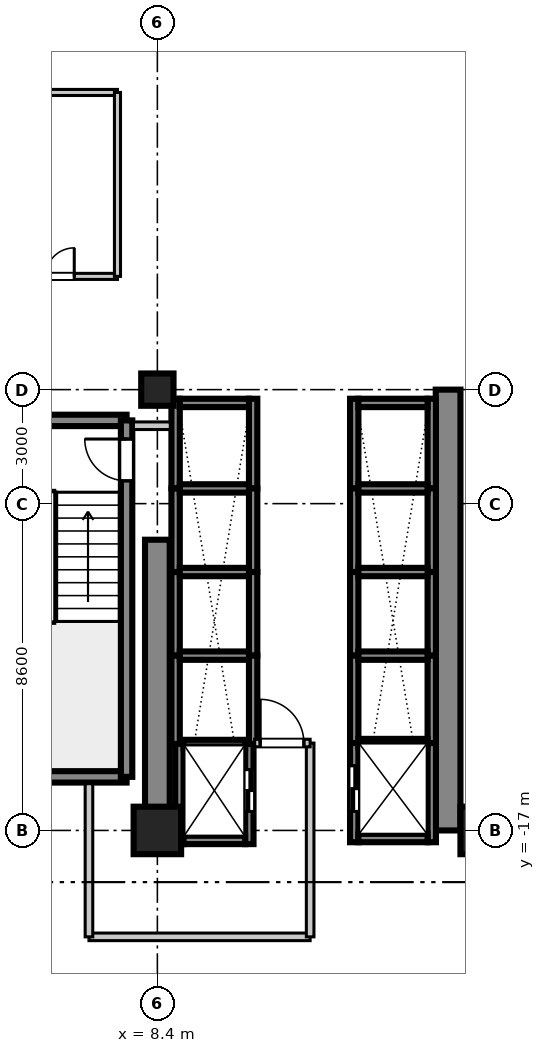
"""IFC4 building model, lengths in metres.
Left out: names, types, materials, properties, quantities, classifications, styles, units other than length and angle.
Written with IfcOpenShell. Run it as: python <this file> out.ifc"""

import sys

from ifc_helpers import new_model, si_unit, direction, frame, frame_2d, origin, origin_2d, place, context, subcontext, project, spatial, rectangle, extrude, source, transform, mapped, element, fill, save


model = new_model("IFC4")
c1 = context("Model", 3, precision=1e-05, world=origin(), true_north=direction((0.0, 1.0)))
c2 = subcontext(c1, "Body", "Model", "MODEL_VIEW")
j1 = project(units=[si_unit("LENGTHUNIT", "METRE"), si_unit("PLANEANGLEUNIT", "RADIAN")], contexts=[c1])
p1 = place(None, origin())
s1 = spatial("IfcSite", under=j1, at=p1, CompositionType="ELEMENT")
p2 = place(p1, origin())
s2 = spatial("IfcBuilding", under=s1, at=p2, CompositionType="ELEMENT")
p3 = place(p2, frame((0.0, 0.0, 117.5)))
s3 = spatial("IfcBuildingStorey", under=s2, at=p3, CompositionType="ELEMENT", Elevation=117.5)
m1 = source(origin(), c2, "Body", "SweptSolid", [
    extrude(rectangle(XDim=1.25, YDim=1.25, at=origin_2d()), origin(), (0.0, 0.0, 1.0), 3.605),
])
p4 = place(p3, frame((8.4, -17.0, 0.0), z_axis=(0.0, 0.0, 1.0), x_axis=(1.0, 0.0, 0.0)))
e1 = element("IfcColumn", 1, at=p4, inside=s3, PredefinedType="COLUMN", context=c2, shape_type="MappedRepresentation", body=[
    mapped(m1, transform((0.0, 0.0, 0.0), scale=1.0)),
])
m2 = source(origin(), c2, "Body", "SweptSolid", [
    extrude(rectangle(XDim=0.85, YDim=0.85, at=origin_2d()), origin(), (0.0, 0.0, 1.0), 3.605),
])
p5 = place(p3, frame((8.4, -5.4, 0.0), z_axis=(0.0, 0.0, 1.0), x_axis=(1.0, 0.0, 0.0)))
e2 = element("IfcColumn", 2, at=p5, inside=s3, PredefinedType="PILASTER", context=c2, shape_type="MappedRepresentation", body=[
    mapped(m2, transform((0.0, 0.0, 0.0), scale=1.0)),
])
p6 = place(p3, frame((17.0, -17.0, 0.0), z_axis=(0.0, 0.0, 1.0), x_axis=(1.0, 0.0, 0.0)))
e3 = element("IfcColumn", 3, at=p6, inside=s3, PredefinedType="COLUMN", context=c2, shape_type="MappedRepresentation", body=[
    mapped(m1, transform((0.0, 0.0, 0.0), scale=1.0)),
])
m3 = source(origin(), c2, "Body", "SweptSolid", [
    extrude(rectangle(XDim=7.65, YDim=0.65, at=frame_2d((3.825, 0.0))), origin(), (0.0, 0.0, 1.0), 3.38),
])
p7 = place(p3, frame((8.4, -17.0, 0.0), z_axis=(0.0, 0.0, 1.0), x_axis=(0.0, 1.0, 0.0)))
e4 = element("IfcWall", 4, at=p7, inside=s3, PredefinedType="SHEAR", context=c2, shape_type="MappedRepresentation", body=[
    mapped(m3, transform((0.0, 0.0, 0.0), scale=1.0)),
])
m4 = source(origin(), c2, "Body", "SweptSolid", [
    extrude(rectangle(XDim=11.6, YDim=0.65, at=frame_2d((5.8, 0.0))), origin(), (0.0, 0.0, 1.0), 3.38),
])
p8 = place(p3, frame((16.05, -17.0, 0.0), z_axis=(0.0, 0.0, 1.0), x_axis=(0.0, 1.0, 0.0)))
e5 = element("IfcWall", 5, at=p8, inside=s3, PredefinedType="SHEAR", context=c2, shape_type="MappedRepresentation", body=[
    mapped(m4, transform((0.0, 0.0, 0.0), scale=1.0)),
])
m5 = source(origin(), c2, "Body", "SweptSolid", [
    extrude(rectangle(XDim=3.98, YDim=0.3, at=frame_2d((1.99, 0.0))), origin(), (0.0, 0.0, 1.0), 3.38),
])
for number, where, z_axis, x_axis in (
    (6, (3.61, -15.59, 0.0), (0.0, 0.0, 1.0), (1.0, 0.0, 0.0)),
    (7, (3.61, -6.21, 0.0), (0.0, 0.0, 1.0), (1.0, 0.0, 0.0)),
):
    element("IfcWall", number, at=place(p3, frame(where, z_axis=z_axis, x_axis=x_axis)), inside=s3, PredefinedType="SHEAR", context=c2, shape_type="MappedRepresentation", body=[
        mapped(m5, transform((0.0, 0.0, 0.0), scale=1.0)),
    ])
m6 = source(origin(), c2, "Body", "SweptSolid", [
    extrude(rectangle(XDim=9.38, YDim=0.3, at=frame_2d((4.69, 0.0))), origin(), (0.0, 0.0, 1.0), 3.38),
])
p9 = place(p3, frame((7.59, -15.59, 0.0), z_axis=(0.0, 0.0, 1.0), x_axis=(0.0, 1.0, 0.0)))
e8 = element("IfcWall", 8, at=p9, inside=s3, PredefinedType="SHEAR", context=c2, shape_type="MappedRepresentation", body=[
    mapped(m6, transform((0.0, 0.0, 0.0), scale=1.0)),
])
p10 = place(p9, frame((7.79, 0.0, 0.0)))
e9 = element("IfcOpeningElement", 9, at=p10, cuts=e8, PredefinedType="OPENING", context=c2, shape_type="SweptSolid", body=[
    extrude(rectangle(XDim=1.1, YDim=2.15, at=frame_2d((0.55, 1.075))), frame((0.0, 0.16, 0.0), z_axis=(0.0, -1.0, 0.0), x_axis=(1.0, 0.0, 0.0)), (0.0, 0.0, 1.0), 0.32),
])
m7 = source(origin(), c2, "Body", "SweptSolid", [
    extrude(rectangle(XDim=2.36, YDim=0.22, at=frame_2d((1.18, 0.0))), origin(), (0.0, 0.0, 1.0), 3.38),
])
for number, where, z_axis, x_axis in (
    (10, (13.58, -8.0, 0.0), (0.0, 0.0, 1.0), (0.0, 1.0, 0.0)),
    (11, (15.62, -8.0, 0.0), (0.0, 0.0, 1.0), (0.0, 1.0, 0.0)),
):
    element("IfcWall", number, at=place(p3, frame(where, z_axis=z_axis, x_axis=x_axis)), inside=s3, PredefinedType="SHEAR", context=c2, shape_type="MappedRepresentation", body=[
        mapped(m7, transform((0.0, 0.0, 0.0), scale=1.0)),
    ])
m8 = source(origin(), c2, "Body", "SweptSolid", [
    extrude(rectangle(XDim=1.82, YDim=0.22, at=frame_2d((0.91, 0.0))), origin(), (0.0, 0.0, 1.0), 3.38),
])
p11 = place(p3, frame((13.69, -5.75, 0.0), z_axis=(0.0, 0.0, 1.0), x_axis=(1.0, 0.0, 0.0)))
e12 = element("IfcWall", 12, at=p11, inside=s3, PredefinedType="SHEAR", context=c2, shape_type="MappedRepresentation", body=[
    mapped(m8, transform((0.0, 0.0, 0.0), scale=1.0)),
])
m9 = source(origin(), c2, "Body", "SweptSolid", [
    extrude(rectangle(XDim=2.2, YDim=0.22, at=frame_2d((1.1, 0.0))), origin(), (0.0, 0.0, 1.0), 3.38),
])
for number, where, z_axis, x_axis in (
    (13, (13.58, -10.2, 0.0), (0.0, 0.0, 1.0), (0.0, 1.0, 0.0)),
    (14, (15.62, -10.2, 0.0), (0.0, 0.0, 1.0), (0.0, 1.0, 0.0)),
):
    element("IfcWall", number, at=place(p3, frame(where, z_axis=z_axis, x_axis=x_axis)), inside=s3, PredefinedType="SHEAR", context=c2, shape_type="MappedRepresentation", body=[
        mapped(m9, transform((0.0, 0.0, 0.0), scale=1.0)),
    ])
m10 = source(origin(), c2, "Body", "SweptSolid", [
    extrude(rectangle(XDim=1.82, YDim=0.22, at=frame_2d((0.91, 0.0))), origin(), (0.0, 0.0, 1.0), 3.65),
])
p12 = place(p3, frame((13.69, -8.0, 0.0), z_axis=(0.0, 0.0, 1.0), x_axis=(1.0, 0.0, 0.0)))
e15 = element("IfcWall", 15, at=p12, inside=s3, PredefinedType="SHEAR", context=c2, shape_type="MappedRepresentation", body=[
    mapped(m10, transform((0.0, 0.0, 0.0), scale=1.0)),
])
for number, where, z_axis, x_axis in (
    (16, (13.58, -12.4, 0.0), (0.0, 0.0, 1.0), (0.0, 1.0, 0.0)),
    (17, (15.62, -12.4, 0.0), (0.0, 0.0, 1.0), (0.0, 1.0, 0.0)),
):
    element("IfcWall", number, at=place(p3, frame(where, z_axis=z_axis, x_axis=x_axis)), inside=s3, PredefinedType="SHEAR", context=c2, shape_type="MappedRepresentation", body=[
        mapped(m9, transform((0.0, 0.0, 0.0), scale=1.0)),
    ])
p13 = place(p3, frame((13.69, -10.2, 0.0), z_axis=(0.0, 0.0, 1.0), x_axis=(1.0, 0.0, 0.0)))
e18 = element("IfcWall", 18, at=p13, inside=s3, PredefinedType="SHEAR", context=c2, shape_type="MappedRepresentation", body=[
    mapped(m10, transform((0.0, 0.0, 0.0), scale=1.0)),
])
m11 = source(origin(), c2, "Body", "SweptSolid", [
    extrude(rectangle(XDim=2.3, YDim=0.22, at=frame_2d((1.15, 0.0))), origin(), (0.0, 0.0, 1.0), 3.38),
])
for number, where, z_axis, x_axis in (
    (19, (13.58, -14.7, 0.0), (0.0, 0.0, 1.0), (0.0, 1.0, 0.0)),
    (20, (15.62, -14.7, 0.0), (0.0, 0.0, 1.0), (0.0, 1.0, 0.0)),
):
    element("IfcWall", number, at=place(p3, frame(where, z_axis=z_axis, x_axis=x_axis)), inside=s3, PredefinedType="SHEAR", context=c2, shape_type="MappedRepresentation", body=[
        mapped(m11, transform((0.0, 0.0, 0.0), scale=1.0)),
    ])
p14 = place(p3, frame((13.69, -12.4, 0.0), z_axis=(0.0, 0.0, 1.0), x_axis=(1.0, 0.0, 0.0)))
e21 = element("IfcWall", 21, at=p14, inside=s3, PredefinedType="SHEAR", context=c2, shape_type="MappedRepresentation", body=[
    mapped(m10, transform((0.0, 0.0, 0.0), scale=1.0)),
])
for number, where, z_axis, x_axis in (
    (22, (8.88, -8.0, 0.0), (0.0, 0.0, 1.0), (0.0, 1.0, 0.0)),
    (23, (10.92, -8.0, 0.0), (0.0, 0.0, 1.0), (0.0, 1.0, 0.0)),
):
    element("IfcWall", number, at=place(p3, frame(where, z_axis=z_axis, x_axis=x_axis)), inside=s3, PredefinedType="SHEAR", context=c2, shape_type="MappedRepresentation", body=[
        mapped(m7, transform((0.0, 0.0, 0.0), scale=1.0)),
    ])
p15 = place(p3, frame((8.99, -5.75, 0.0), z_axis=(0.0, 0.0, 1.0), x_axis=(1.0, 0.0, 0.0)))
e24 = element("IfcWall", 24, at=p15, inside=s3, PredefinedType="SHEAR", context=c2, shape_type="MappedRepresentation", body=[
    mapped(m8, transform((0.0, 0.0, 0.0), scale=1.0)),
])
for number, where, z_axis, x_axis in (
    (25, (8.88, -10.2, 0.0), (0.0, 0.0, 1.0), (0.0, 1.0, 0.0)),
    (26, (10.92, -10.2, 0.0), (0.0, 0.0, 1.0), (0.0, 1.0, 0.0)),
):
    element("IfcWall", number, at=place(p3, frame(where, z_axis=z_axis, x_axis=x_axis)), inside=s3, PredefinedType="SHEAR", context=c2, shape_type="MappedRepresentation", body=[
        mapped(m9, transform((0.0, 0.0, 0.0), scale=1.0)),
    ])
p16 = place(p3, frame((8.99, -8.0, 0.0), z_axis=(0.0, 0.0, 1.0), x_axis=(1.0, 0.0, 0.0)))
e27 = element("IfcWall", 27, at=p16, inside=s3, PredefinedType="SHEAR", context=c2, shape_type="MappedRepresentation", body=[
    mapped(m10, transform((0.0, 0.0, 0.0), scale=1.0)),
])
for number, where, z_axis, x_axis in (
    (28, (8.88, -12.4, 0.0), (0.0, 0.0, 1.0), (0.0, 1.0, 0.0)),
    (29, (10.92, -12.4, 0.0), (0.0, 0.0, 1.0), (0.0, 1.0, 0.0)),
):
    element("IfcWall", number, at=place(p3, frame(where, z_axis=z_axis, x_axis=x_axis)), inside=s3, PredefinedType="SHEAR", context=c2, shape_type="MappedRepresentation", body=[
        mapped(m9, transform((0.0, 0.0, 0.0), scale=1.0)),
    ])
p17 = place(p3, frame((8.99, -10.2, 0.0), z_axis=(0.0, 0.0, 1.0), x_axis=(1.0, 0.0, 0.0)))
e30 = element("IfcWall", 30, at=p17, inside=s3, PredefinedType="SHEAR", context=c2, shape_type="MappedRepresentation", body=[
    mapped(m10, transform((0.0, 0.0, 0.0), scale=1.0)),
])
m12 = source(origin(), c2, "Body", "SweptSolid", [
    extrude(rectangle(XDim=2.325, YDim=0.22, at=frame_2d((1.163, 0.0))), origin(), (0.0, 0.0, 1.0), 3.38),
])
for number, where, z_axis, x_axis in (
    (31, (8.88, -14.725, 0.0), (0.0, 0.0, 1.0), (0.0, 1.0, 0.0)),
    (32, (10.92, -14.725, 0.0), (0.0, 0.0, 1.0), (0.0, 1.0, 0.0)),
):
    element("IfcWall", number, at=place(p3, frame(where, z_axis=z_axis, x_axis=x_axis)), inside=s3, PredefinedType="SHEAR", context=c2, shape_type="MappedRepresentation", body=[
        mapped(m12, transform((0.0, 0.0, 0.0), scale=1.0)),
    ])
p18 = place(p3, frame((8.99, -12.4, 0.0), z_axis=(0.0, 0.0, 1.0), x_axis=(1.0, 0.0, 0.0)))
e33 = element("IfcWall", 33, at=p18, inside=s3, PredefinedType="SHEAR", context=c2, shape_type="MappedRepresentation", body=[
    mapped(m10, transform((0.0, 0.0, 0.0), scale=1.0)),
])
m13 = source(origin(), c2, "Body", "SweptSolid", [
    extrude(rectangle(XDim=2.635, YDim=0.22, at=frame_2d((1.317, 0.0))), origin(), (0.0, 0.0, 1.0), 3.38),
])
p19 = place(p3, frame((8.98, -17.36, 0.0), z_axis=(0.0, 0.0, 1.0), x_axis=(0.0, 1.0, 0.0)))
e34 = element("IfcWall", 34, at=p19, inside=s3, PredefinedType="SHEAR", context=c2, shape_type="MappedRepresentation", body=[
    mapped(m13, transform((0.0, 0.0, 0.0), scale=1.0)),
])
p20 = place(p3, frame((10.82, -17.36, 0.0), z_axis=(0.0, 0.0, 1.0), x_axis=(0.0, 1.0, 0.0)))
e35 = element("IfcWall", 35, at=p20, inside=s3, PredefinedType="SHEAR", context=c2, shape_type="MappedRepresentation", body=[
    mapped(m13, transform((0.0, 0.0, 0.0), scale=1.0)),
])
p21 = place(p20, frame((0.86, 0.0, 0.0)))
e36 = element("IfcOpeningElement", 36, at=p21, cuts=e35, PredefinedType="OPENING", context=c2, shape_type="SweptSolid", body=[
    extrude(rectangle(XDim=1.1, YDim=2.2, at=frame_2d((0.55, 1.1))), frame((0.0, 0.12, 0.0), z_axis=(0.0, -1.0, 0.0), x_axis=(1.0, 0.0, 0.0)), (0.0, 0.0, 1.0), 0.24),
])
m14 = source(origin(), c2, "Body", "SweptSolid", [
    extrude(rectangle(XDim=1.62, YDim=0.22, at=frame_2d((0.81, 0.0))), origin(), (0.0, 0.0, 1.0), 3.38),
])
p22 = place(p3, frame((9.09, -17.25, 0.0), z_axis=(0.0, 0.0, 1.0), x_axis=(1.0, 0.0, 0.0)))
e37 = element("IfcWall", 37, at=p22, inside=s3, PredefinedType="SHEAR", context=c2, shape_type="MappedRepresentation", body=[
    mapped(m14, transform((0.0, 0.0, 0.0), scale=1.0)),
])
m15 = source(origin(), c2, "Body", "SweptSolid", [
    extrude(rectangle(XDim=1.62, YDim=0.22, at=frame_2d((0.81, 0.0))), origin(), (0.0, 0.0, 1.0), 3.65),
])
p23 = place(p3, frame((9.09, -14.725, 0.0), z_axis=(0.0, 0.0, 1.0), x_axis=(1.0, 0.0, 0.0)))
e38 = element("IfcWall", 38, at=p23, inside=s3, PredefinedType="SHEAR", context=c2, shape_type="MappedRepresentation", body=[
    mapped(m15, transform((0.0, 0.0, 0.0), scale=1.0)),
])
m16 = source(origin(), c2, "Body", "SweptSolid", [
    extrude(rectangle(XDim=2.61, YDim=0.22, at=frame_2d((1.305, 0.0))), origin(), (0.0, 0.0, 1.0), 3.38),
])
p24 = place(p3, frame((13.58, -17.31, 0.0), z_axis=(0.0, 0.0, 1.0), x_axis=(0.0, 1.0, 0.0)))
e39 = element("IfcWall", 39, at=p24, inside=s3, PredefinedType="SHEAR", context=c2, shape_type="MappedRepresentation", body=[
    mapped(m16, transform((0.0, 0.0, 0.0), scale=1.0)),
])
p25 = place(p24, frame((0.81, 0.0, 0.0)))
e40 = element("IfcOpeningElement", 40, at=p25, cuts=e39, PredefinedType="OPENING", context=c2, shape_type="SweptSolid", body=[
    extrude(rectangle(XDim=1.2, YDim=2.2, at=frame_2d((0.6, 1.1))), frame((0.0, 0.12, 0.0), z_axis=(0.0, -1.0, 0.0), x_axis=(1.0, 0.0, 0.0)), (0.0, 0.0, 1.0), 0.24),
])
p26 = place(p3, frame((15.62, -17.31, 0.0), z_axis=(0.0, 0.0, 1.0), x_axis=(0.0, 1.0, 0.0)))
e41 = element("IfcWall", 41, at=p26, inside=s3, PredefinedType="SHEAR", context=c2, shape_type="MappedRepresentation", body=[
    mapped(m16, transform((0.0, 0.0, 0.0), scale=1.0)),
])
p27 = place(p3, frame((13.69, -17.2, 0.0), z_axis=(0.0, 0.0, 1.0), x_axis=(1.0, 0.0, 0.0)))
e42 = element("IfcWall", 42, at=p27, inside=s3, PredefinedType="SHEAR", context=c2, shape_type="MappedRepresentation", body=[
    mapped(m8, transform((0.0, 0.0, 0.0), scale=1.0)),
])
p28 = place(p3, frame((13.69, -14.7, 0.0), z_axis=(0.0, 0.0, 1.0), x_axis=(1.0, 0.0, 0.0)))
e43 = element("IfcWall", 43, at=p28, inside=s3, PredefinedType="SHEAR", context=c2, shape_type="MappedRepresentation", body=[
    mapped(m10, transform((0.0, 0.0, 0.0), scale=1.0)),
])
m17 = source(origin(), c2, "Body", "SweptSolid", [
    extrude(rectangle(XDim=5.82, YDim=0.2, at=frame_2d((2.91, 0.0))), origin(), (0.0, 0.0, 1.0), 2.72),
])
p29 = place(p3, frame((6.6, -19.8, 0.0), z_axis=(0.0, 0.0, 1.0), x_axis=(1.0, 0.0, 0.0)))
e44 = element("IfcWall", 44, at=p29, inside=s3, PredefinedType="PARTITIONING", context=c2, shape_type="MappedRepresentation", body=[
    mapped(m17, transform((0.0, 0.0, 0.0), scale=1.0)),
])
m18 = source(origin(), c2, "Body", "SweptSolid", [
    extrude(rectangle(XDim=4.03, YDim=0.2, at=frame_2d((2.015, 0.0))), origin(), (0.0, 0.0, 1.0), 2.72),
])
p30 = place(p3, frame((6.6, -19.8, 0.0), z_axis=(0.0, 0.0, 1.0), x_axis=(0.0, 1.0, 0.0)))
e45 = element("IfcWall", 45, at=p30, inside=s3, PredefinedType="PARTITIONING", context=c2, shape_type="MappedRepresentation", body=[
    mapped(m18, transform((0.0, 0.0, 0.0), scale=1.0)),
])
m19 = source(origin(), c2, "Body", "SweptSolid", [
    extrude(rectangle(XDim=5.1, YDim=0.2, at=frame_2d((2.55, 0.0))), origin(), (0.0, 0.0, 1.0), 2.72),
])
p31 = place(p3, frame((12.42, -19.8, 0.0), z_axis=(0.0, 0.0, 1.0), x_axis=(0.0, 1.0, 0.0)))
e46 = element("IfcWall", 46, at=p31, inside=s3, PredefinedType="PARTITIONING", context=c2, shape_type="MappedRepresentation", body=[
    mapped(m19, transform((0.0, 0.0, 0.0), scale=1.0)),
])
m20 = source(origin(), c2, "Body", "SweptSolid", [
    extrude(rectangle(XDim=1.46, YDim=0.2, at=frame_2d((0.73, 0.0))), origin(), (0.0, 0.0, 1.0), 2.72),
])
p32 = place(p3, frame((10.96, -14.7, 0.0), z_axis=(0.0, 0.0, 1.0), x_axis=(1.0, 0.0, 0.0)))
e47 = element("IfcWall", 47, at=p32, inside=s3, PredefinedType="PARTITIONING", context=c2, shape_type="MappedRepresentation", body=[
    mapped(m20, transform((0.0, 0.0, 0.0), scale=1.0)),
])
p33 = place(p32, frame((0.145, 0.0, 0.0)))
e48 = element("IfcOpeningElement", 48, at=p33, cuts=e47, PredefinedType="OPENING", context=c2, shape_type="SweptSolid", body=[
    extrude(rectangle(XDim=1.15, YDim=2.15, at=frame_2d((0.575, 1.075))), frame((0.0, 0.11, 0.0), z_axis=(0.0, -1.0, 0.0), x_axis=(1.0, 0.0, 0.0)), (0.0, 0.0, 1.0), 0.22),
])
m21 = source(origin(), c2, "Body", "SweptSolid", [
    extrude(rectangle(XDim=0.97, YDim=0.2, at=frame_2d((0.485, 0.0))), origin(), (0.0, 0.0, 1.0), 2.72),
])
p34 = place(p3, frame((7.77, -6.35, 0.0), z_axis=(0.0, 0.0, 1.0), x_axis=(1.0, 0.0, 0.0)))
e49 = element("IfcWall", 49, at=p34, inside=s3, PredefinedType="PARTITIONING", context=c2, shape_type="MappedRepresentation", body=[
    mapped(m21, transform((0.0, 0.0, 0.0), scale=1.0)),
])
m22 = source(origin(), c2, "Body", "SweptSolid", [
    extrude(rectangle(XDim=11.02, YDim=0.16, at=frame_2d((5.51, 0.0))), origin(), (0.0, 0.0, 1.0), 2.72),
])
p35 = place(p3, frame((-3.67, -2.42, 0.0), z_axis=(0.0, 0.0, 1.0), x_axis=(1.0, 0.0, 0.0)))
e50 = element("IfcWall", 50, at=p35, inside=s3, PredefinedType="PARTITIONING", context=c2, shape_type="MappedRepresentation", body=[
    mapped(m22, transform((0.0, 0.0, 0.0), scale=1.0)),
])
p36 = place(p35, frame((8.383, 0.0, 0.0)))
e51 = element("IfcOpeningElement", 51, at=p36, cuts=e50, PredefinedType="OPENING", context=c2, shape_type="SweptSolid", body=[
    extrude(rectangle(XDim=1.5, YDim=2.15, at=frame_2d((0.75, 1.075))), frame((0.0, 0.09, 0.0), z_axis=(0.0, -1.0, 0.0), x_axis=(1.0, 0.0, 0.0)), (0.0, 0.0, 1.0), 0.18),
])
p37 = place(p3, frame((-3.67, 2.42, 0.0), z_axis=(0.0, 0.0, 1.0), x_axis=(1.0, 0.0, 0.0)))
e52 = element("IfcWall", 52, at=p37, inside=s3, PredefinedType="PARTITIONING", context=c2, shape_type="MappedRepresentation", body=[
    mapped(m22, transform((0.0, 0.0, 0.0), scale=1.0)),
])
m23 = source(origin(), c2, "Body", "SweptSolid", [
    extrude(rectangle(XDim=4.84, YDim=0.16, at=frame_2d((2.42, 0.0))), origin(), (0.0, 0.0, 1.0), 2.72),
])
p38 = place(p3, frame((7.35, -2.42, 0.0), z_axis=(0.0, 0.0, 1.0), x_axis=(0.0, 1.0, 0.0)))
e53 = element("IfcWall", 53, at=p38, inside=s3, PredefinedType="PARTITIONING", context=c2, shape_type="MappedRepresentation", body=[
    mapped(m23, transform((0.0, 0.0, 0.0), scale=1.0)),
])
m24 = source(origin(), c2, "Body", "SweptSolid", [
    extrude(rectangle(XDim=1.1, YDim=2.15, at=frame_2d((0.55, 1.075))), frame((0.0, 0.025, 0.0), z_axis=(0.0, -1.0, 0.0), x_axis=(1.0, 0.0, 0.0)), (0.0, 0.0, 1.0), 0.05),
])
p39 = place(p10, origin())
e54 = element("IfcDoor", 54, at=p39, inside=s3, OperationType="SINGLE_SWING_RIGHT", PredefinedType="DOOR", context=c2, shape_type="MappedRepresentation", body=[
    mapped(m24, transform((0.0, 0.0, 0.0), scale=1.0)),
])
fill(e9, e54)
m25 = source(origin(), c2, "Body", "SweptSolid", [
    extrude(rectangle(XDim=1.1, YDim=2.2, at=frame_2d((0.55, 1.1))), frame((0.0, 0.025, 0.0), z_axis=(0.0, -1.0, 0.0), x_axis=(1.0, 0.0, 0.0)), (0.0, 0.0, 1.0), 0.05),
])
p40 = place(p21, frame((1.1, 0.0, 0.0), z_axis=(0.0, 0.0, 1.0), x_axis=(-1.0, 0.0, 0.0)))
e55 = element("IfcDoor", 55, at=p40, inside=s3, OperationType="DOUBLE_DOOR_SLIDING", PredefinedType="DOOR", context=c2, shape_type="MappedRepresentation", body=[
    mapped(m25, transform((0.0, 0.0, 0.0), scale=1.0)),
])
fill(e36, e55)
m26 = source(origin(), c2, "Body", "SweptSolid", [
    extrude(rectangle(XDim=1.2, YDim=2.2, at=frame_2d((0.6, 1.1))), frame((0.0, 0.025, 0.0), z_axis=(0.0, -1.0, 0.0), x_axis=(1.0, 0.0, 0.0)), (0.0, 0.0, 1.0), 0.05),
])
p41 = place(p25, origin())
e56 = element("IfcDoor", 56, at=p41, inside=s3, OperationType="DOUBLE_DOOR_SLIDING", PredefinedType="DOOR", context=c2, shape_type="MappedRepresentation", body=[
    mapped(m26, transform((0.0, 0.0, 0.0), scale=1.0)),
])
fill(e40, e56)
m27 = source(origin(), c2, "Body", "SweptSolid", [
    extrude(rectangle(XDim=1.15, YDim=2.15, at=frame_2d((0.575, 1.075))), frame((0.0, 0.025, 0.0), z_axis=(0.0, -1.0, 0.0), x_axis=(1.0, 0.0, 0.0)), (0.0, 0.0, 1.0), 0.05),
])
p42 = place(p33, origin())
e57 = element("IfcDoor", 57, at=p42, inside=s3, OperationType="SINGLE_SWING_LEFT", PredefinedType="DOOR", context=c2, shape_type="MappedRepresentation", body=[
    mapped(m27, transform((0.0, 0.0, 0.0), scale=1.0)),
])
fill(e48, e57)
m28 = source(origin(), c2, "Body", "SweptSolid", [
    extrude(rectangle(XDim=1.5, YDim=2.15, at=frame_2d((0.75, 1.075))), frame((0.0, 0.025, 0.0), z_axis=(0.0, -1.0, 0.0), x_axis=(1.0, 0.0, 0.0)), (0.0, 0.0, 1.0), 0.05),
])
p43 = place(p36, origin())
e58 = element("IfcDoor", 58, at=p43, inside=s3, OperationType="DOUBLE_DOOR_SINGLE_SWING", PredefinedType="DOOR", context=c2, shape_type="MappedRepresentation", body=[
    mapped(m28, transform((0.0, 0.0, 0.0), scale=1.0)),
])
fill(e51, e58)
save(model, sys.argv[1])
